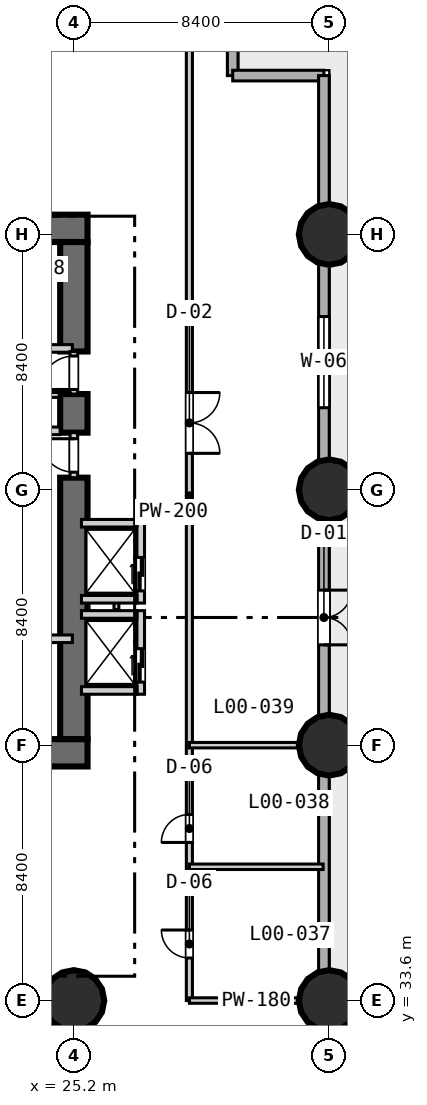
"""IFC4 building model, lengths in metres.
Left out: names, types, materials, properties, quantities, classifications, styles, units other than length and angle.
Written with IfcOpenShell. Run it as: python <this file> out.ifc"""

import sys

from ifc_helpers import new_model, si_unit, direction, frame, frame_2d, origin, origin_2d, place, context, subcontext, project, spatial, rectangle, circle, extrude, element, fill, save


model = new_model("IFC4")
c1 = context("Model", 3, precision=1e-05, world=origin(), true_north=direction((0.0, 1.0)))
c2 = subcontext(c1, "Body", "Model", "MODEL_VIEW")
j1 = project(units=[si_unit("LENGTHUNIT", "METRE"), si_unit("PLANEANGLEUNIT", "RADIAN")], contexts=[c1])
p1 = place(None, origin())
s1 = spatial("IfcSite", under=j1, at=p1, CompositionType="ELEMENT")
p2 = place(p1, origin())
s2 = spatial("IfcBuilding", under=s1, at=p2, CompositionType="ELEMENT")
p3 = place(p2, origin())
s3 = spatial("IfcBuildingStorey", under=s2, at=p3, CompositionType="ELEMENT", Elevation=0.0)
for number, where, z_axis, x_axis in (
    (1, (20.5, 41.75, 0.0), (0.0, 0.0, 1.0), (1.0, 0.0, 0.0)),
    (2, (20.5, 59.0, 0.0), (0.0, 0.0, 1.0), (1.0, 0.0, 0.0)),
):
    element("IfcWall", number, at=place(p3, frame(where, z_axis=z_axis, x_axis=x_axis)), inside=s3, PredefinedType="SHEAR", context=c2, shape_type="SweptSolid", body=[
        extrude(rectangle(XDim=5.15, YDim=0.9, at=frame_2d((2.575, 0.0))), origin(), (0.0, 0.0, 1.0), 5.65),
    ])
p4 = place(p3, frame((25.2, 42.2, 0.0), z_axis=(0.0, 0.0, 1.0), x_axis=(0.0, 1.0, 0.0)))
e3 = element("IfcWall", 3, at=p4, inside=s3, PredefinedType="SHEAR", context=c2, shape_type="SweptSolid", body=[
    extrude(rectangle(XDim=8.6, YDim=0.9, at=frame_2d((4.3, 0.0))), origin(), (0.0, 0.0, 1.0), 5.65),
])
p5 = place(p3, frame((25.2, 52.28, 0.0), z_axis=(0.0, 0.0, 1.0), x_axis=(0.0, 1.0, 0.0)))
e4 = element("IfcWall", 4, at=p5, inside=s3, PredefinedType="SHEAR", context=c2, shape_type="SweptSolid", body=[
    extrude(rectangle(XDim=1.27, YDim=0.9, at=frame_2d((0.635, 0.0))), origin(), (0.0, 0.0, 1.0), 5.65),
])
p6 = place(p3, frame((25.2, 54.95, 0.0), z_axis=(0.0, 0.0, 1.0), x_axis=(0.0, 1.0, 0.0)))
e5 = element("IfcWall", 5, at=p6, inside=s3, PredefinedType="SHEAR", context=c2, shape_type="SweptSolid", body=[
    extrude(rectangle(XDim=3.6, YDim=0.9, at=frame_2d((1.8, 0.0))), origin(), (0.0, 0.0, 1.0), 5.65),
])
for number, where, z_axis, x_axis in (
    (6, (25.2, 33.6, 0.0), (0.0, 0.0, 1.0), (1.0, 0.0, 0.0)),
    (7, (33.6, 33.6, 0.0), (0.0, 0.0, 1.0), (1.0, 0.0, 0.0)),
    (8, (33.6, 42.0, 0.0), (0.0, 0.0, 1.0), (1.0, 0.0, 0.0)),
    (9, (33.6, 50.4, 0.0), (0.0, 0.0, 1.0), (1.0, 0.0, 0.0)),
    (10, (33.6, 58.8, 0.0), (0.0, 0.0, 1.0), (1.0, 0.0, 0.0)),
):
    element("IfcColumn", number, at=place(p3, frame(where, z_axis=z_axis, x_axis=x_axis)), inside=s3, PredefinedType="USERDEFINED", context=c2, shape_type="SweptSolid", body=[
        extrude(circle(Radius=1.0, at=origin_2d()), origin(), (0.0, 0.0, 1.0), 6.0),
    ])
for number, where, z_axis, x_axis in (
    (11, (30.425, 67.025, 0.0), (0.0, 0.0, 1.0), (0.0, -1.0, 0.0)),
    (12, (30.425, 64.025, 0.0), (0.0, 0.0, 1.0), (1.0, 0.0, 0.0)),
):
    element("IfcWall", number, at=place(p3, frame(where, z_axis=z_axis, x_axis=x_axis)), inside=s3, PredefinedType="STANDARD", context=c2, shape_type="SweptSolid", body=[
        extrude(rectangle(XDim=3.0, YDim=0.35, at=frame_2d((1.5, 0.0))), origin(), (0.0, 0.0, 1.0), 5.65),
    ])
p7 = place(p3, frame((33.425, 64.025, 0.0), z_axis=(0.0, 0.0, 1.0), x_axis=(0.0, -1.0, 0.0)))
e13 = element("IfcWall", 13, at=p7, inside=s3, PredefinedType="STANDARD", context=c2, shape_type="SweptSolid", body=[
    extrude(rectangle(XDim=30.6, YDim=0.35, at=frame_2d((15.3, 0.0))), origin(), (0.0, 0.0, 1.0), 4.8),
])
p8 = place(p7, frame((16.925, 0.0, 0.0)))
e14 = element("IfcOpeningElement", 14, at=p8, cuts=e13, PredefinedType="OPENING", context=c2, shape_type="SweptSolid", body=[
    extrude(rectangle(XDim=1.8, YDim=2.2, at=frame_2d((0.9, 1.1))), frame((0.0, 0.185, 0.0), z_axis=(0.0, -1.0, 0.0), x_axis=(1.0, 0.0, 0.0)), (0.0, 0.0, 1.0), 0.37),
])
p9 = place(p7, frame((7.925, 0.0, 0.85)))
e15 = element("IfcOpeningElement", 15, at=p9, cuts=e13, PredefinedType="OPENING", context=c2, shape_type="SweptSolid", body=[
    extrude(rectangle(XDim=3.0, YDim=2.4, at=frame_2d((1.5, 1.2))), frame((0.0, 0.185, 0.0), z_axis=(0.0, -1.0, 0.0), x_axis=(1.0, 0.0, 0.0)), (0.0, 0.0, 1.0), 0.37),
])
p10 = place(p3, frame((33.425, 33.425, 0.0), z_axis=(0.0, 0.0, 1.0), x_axis=(1.0, 0.0, 0.0)))
e16 = element("IfcWall", 16, at=p10, inside=s3, PredefinedType="STANDARD", context=c2, shape_type="SweptSolid", body=[
    extrude(rectangle(XDim=30.6, YDim=0.35, at=frame_2d((15.3, 0.0))), origin(), (0.0, 0.0, 1.0), 4.8),
])
p11 = place(p3, frame((21.0, 45.5, 0.0), z_axis=(0.0, 0.0, 1.0), x_axis=(1.0, 0.0, 0.0)))
e17 = element("IfcWall", 17, at=p11, inside=s3, PredefinedType="SOLIDWALL", context=c2, shape_type="SweptSolid", body=[
    extrude(rectangle(XDim=4.15, YDim=0.25, at=frame_2d((2.075, 0.0))), origin(), (0.0, 0.0, 1.0), 5.65),
])
p12 = place(p11, frame((0.65, 0.0, 0.0)))
e18 = element("IfcOpeningElement", 18, at=p12, cuts=e17, PredefinedType="OPENING", context=c2, shape_type="SweptSolid", body=[
    extrude(rectangle(XDim=1.1, YDim=2.15, at=frame_2d((0.55, 1.075))), frame((0.0, 0.135, 0.0), z_axis=(0.0, -1.0, 0.0), x_axis=(1.0, 0.0, 0.0)), (0.0, 0.0, 1.0), 0.27),
])
p13 = place(p3, frame((25.2, 50.8, 0.0), z_axis=(0.0, 0.0, 1.0), x_axis=(0.0, 1.0, 0.0)))
e19 = element("IfcWall", 19, at=p13, inside=s3, PredefinedType="SOLIDWALL", context=c2, shape_type="SweptSolid", body=[
    extrude(rectangle(XDim=1.48, YDim=0.25, at=frame_2d((0.74, 0.0))), origin(), (0.0, 0.0, 1.0), 5.65),
])
p14 = place(p13, frame((0.18, 0.0, 0.0)))
e20 = element("IfcOpeningElement", 20, at=p14, cuts=e19, PredefinedType="OPENING", context=c2, shape_type="SweptSolid", body=[
    extrude(rectangle(XDim=1.1, YDim=2.15, at=frame_2d((0.55, 1.075))), frame((0.0, 0.135, 0.0), z_axis=(0.0, -1.0, 0.0), x_axis=(1.0, 0.0, 0.0)), (0.0, 0.0, 1.0), 0.27),
])
p15 = place(p3, frame((21.0, 52.34, 0.0), z_axis=(0.0, 0.0, 1.0), x_axis=(1.0, 0.0, 0.0)))
e21 = element("IfcWall", 21, at=p15, inside=s3, PredefinedType="SOLIDWALL", context=c2, shape_type="SweptSolid", body=[
    extrude(rectangle(XDim=3.75, YDim=0.25, at=frame_2d((1.875, 0.0))), origin(), (0.0, 0.0, 1.0), 5.65),
])
p16 = place(p3, frame((21.0, 55.05, 0.0), z_axis=(0.0, 0.0, 1.0), x_axis=(1.0, 0.0, 0.0)))
e22 = element("IfcWall", 22, at=p16, inside=s3, PredefinedType="SOLIDWALL", context=c2, shape_type="SweptSolid", body=[
    extrude(rectangle(XDim=4.15, YDim=0.25, at=frame_2d((2.075, 0.0))), origin(), (0.0, 0.0, 1.0), 5.65),
])
p17 = place(p16, frame((1.85, 0.0, 0.0)))
e23 = element("IfcOpeningElement", 23, at=p17, cuts=e22, PredefinedType="OPENING", context=c2, shape_type="SweptSolid", body=[
    extrude(rectangle(XDim=1.1, YDim=2.15, at=frame_2d((0.55, 1.075))), frame((0.0, 0.135, 0.0), z_axis=(0.0, -1.0, 0.0), x_axis=(1.0, 0.0, 0.0)), (0.0, 0.0, 1.0), 0.27),
])
p18 = place(p3, frame((25.2, 53.55, 0.0), z_axis=(0.0, 0.0, 1.0), x_axis=(0.0, 1.0, 0.0)))
e24 = element("IfcWall", 24, at=p18, inside=s3, PredefinedType="SOLIDWALL", context=c2, shape_type="SweptSolid", body=[
    extrude(rectangle(XDim=1.4, YDim=0.25, at=frame_2d((0.7, 0.0))), origin(), (0.0, 0.0, 1.0), 5.65),
])
p19 = place(p18, frame((0.15, 0.0, 0.0)))
e25 = element("IfcOpeningElement", 25, at=p19, cuts=e24, PredefinedType="OPENING", context=c2, shape_type="SweptSolid", body=[
    extrude(rectangle(XDim=1.1, YDim=2.15, at=frame_2d((0.55, 1.075))), frame((0.0, 0.135, 0.0), z_axis=(0.0, -1.0, 0.0), x_axis=(1.0, 0.0, 0.0)), (0.0, 0.0, 1.0), 0.27),
])
p20 = place(p3, frame((22.32, 53.52, 0.0), z_axis=(0.0, 0.0, 1.0), x_axis=(1.0, 0.0, 0.0)))
e26 = element("IfcWall", 26, at=p20, inside=s3, PredefinedType="PARTITIONING", context=c2, shape_type="SweptSolid", body=[
    extrude(rectangle(XDim=2.4, YDim=0.16, at=frame_2d((1.2, 0.0))), origin(), (0.0, 0.0, 1.0), 5.65),
])
p21 = place(p20, frame((0.65, 0.0, 0.0)))
e27 = element("IfcOpeningElement", 27, at=p21, cuts=e26, PredefinedType="OPENING", context=c2, shape_type="SweptSolid", body=[
    extrude(rectangle(XDim=0.9, YDim=2.1, at=frame_2d((0.45, 1.05))), frame((0.0, 0.09, 0.0), z_axis=(0.0, -1.0, 0.0), x_axis=(1.0, 0.0, 0.0)), (0.0, 0.0, 1.0), 0.18),
])
p22 = place(p3, frame((27.4, 43.675, 0.0), z_axis=(0.0, 0.0, 1.0), x_axis=(0.0, 1.0, 0.0)))
e28 = element("IfcWall", 28, at=p22, inside=s3, PredefinedType="SOLIDWALL", context=c2, shape_type="SweptSolid", body=[
    extrude(rectangle(XDim=2.75, YDim=0.25, at=frame_2d((1.375, 0.0))), origin(), (0.0, 0.0, 1.0), 5.65),
])
p23 = place(p22, frame((0.4, 0.0, 0.0)))
e29 = element("IfcOpeningElement", 29, at=p23, cuts=e28, PredefinedType="OPENING", context=c2, shape_type="SweptSolid", body=[
    extrude(rectangle(XDim=1.1, YDim=2.15, at=frame_2d((0.55, 1.075))), frame((0.0, 0.135, 0.0), z_axis=(0.0, -1.0, 0.0), x_axis=(1.0, 0.0, 0.0)), (0.0, 0.0, 1.0), 0.27),
])
for number, where, z_axis, x_axis in (
    (30, (25.45, 43.8, 0.0), (0.0, 0.0, 1.0), (1.0, 0.0, 0.0)),
    (31, (25.45, 46.3, 0.0), (0.0, 0.0, 1.0), (1.0, 0.0, 0.0)),
):
    element("IfcWall", number, at=place(p3, frame(where, z_axis=z_axis, x_axis=x_axis)), inside=s3, PredefinedType="SOLIDWALL", context=c2, shape_type="SweptSolid", body=[
        extrude(rectangle(XDim=1.825, YDim=0.25, at=frame_2d((0.913, 0.0))), origin(), (0.0, 0.0, 1.0), 5.65),
    ])
p24 = place(p3, frame((26.6, 46.46, 0.0), z_axis=(0.0, 0.0, 1.0), x_axis=(0.0, 1.0, 0.0)))
e32 = element("IfcWall", 32, at=p24, inside=s3, PredefinedType="PARTITIONING", context=c2, shape_type="SweptSolid", body=[
    extrude(rectangle(XDim=0.88, YDim=0.16, at=frame_2d((0.44, 0.0))), origin(), (0.0, 0.0, 1.0), 5.65),
])
p25 = place(p3, frame((27.4, 46.675, 0.0), z_axis=(0.0, 0.0, 1.0), x_axis=(0.0, 1.0, 0.0)))
e33 = element("IfcWall", 33, at=p25, inside=s3, PredefinedType="SOLIDWALL", context=c2, shape_type="SweptSolid", body=[
    extrude(rectangle(XDim=2.75, YDim=0.25, at=frame_2d((1.375, 0.0))), origin(), (0.0, 0.0, 1.0), 5.65),
])
p26 = place(p25, frame((0.4, 0.0, 0.0)))
e34 = element("IfcOpeningElement", 34, at=p26, cuts=e33, PredefinedType="OPENING", context=c2, shape_type="SweptSolid", body=[
    extrude(rectangle(XDim=1.1, YDim=2.15, at=frame_2d((0.55, 1.075))), frame((0.0, 0.135, 0.0), z_axis=(0.0, -1.0, 0.0), x_axis=(1.0, 0.0, 0.0)), (0.0, 0.0, 1.0), 0.27),
])
for number, where, z_axis, x_axis in (
    (35, (25.45, 46.8, 0.0), (0.0, 0.0, 1.0), (1.0, 0.0, 0.0)),
    (36, (25.45, 49.3, 0.0), (0.0, 0.0, 1.0), (1.0, 0.0, 0.0)),
):
    element("IfcWall", number, at=place(p3, frame(where, z_axis=z_axis, x_axis=x_axis)), inside=s3, PredefinedType="SOLIDWALL", context=c2, shape_type="SweptSolid", body=[
        extrude(rectangle(XDim=1.825, YDim=0.25, at=frame_2d((0.913, 0.0))), origin(), (0.0, 0.0, 1.0), 5.65),
    ])
p27 = place(p3, frame((29.0, 33.6, 0.0), z_axis=(0.0, 0.0, 1.0), x_axis=(0.0, 1.0, 0.0)))
e37 = element("IfcWall", 37, at=p27, inside=s3, PredefinedType="PARTITIONING", context=c2, shape_type="SweptSolid", body=[
    extrude(rectangle(XDim=33.2, YDim=0.2, at=frame_2d((16.6, 0.0))), origin(), (0.0, 0.0, 1.0), 5.65),
])
p28 = place(p27, frame((1.4, 0.0, 0.0)))
e38 = element("IfcOpeningElement", 38, at=p28, cuts=e37, PredefinedType="OPENING", context=c2, shape_type="SweptSolid", body=[
    extrude(rectangle(XDim=0.92, YDim=2.1, at=frame_2d((0.46, 1.05))), frame((0.0, 0.11, 0.0), z_axis=(0.0, -1.0, 0.0), x_axis=(1.0, 0.0, 0.0)), (0.0, 0.0, 1.0), 0.22),
])
p29 = place(p27, frame((5.2, 0.0, 0.0)))
e39 = element("IfcOpeningElement", 39, at=p29, cuts=e37, PredefinedType="OPENING", context=c2, shape_type="SweptSolid", body=[
    extrude(rectangle(XDim=0.92, YDim=2.1, at=frame_2d((0.46, 1.05))), frame((0.0, 0.11, 0.0), z_axis=(0.0, -1.0, 0.0), x_axis=(1.0, 0.0, 0.0)), (0.0, 0.0, 1.0), 0.22),
])
p30 = place(p27, frame((18.0, 0.0, 0.0)))
e40 = element("IfcOpeningElement", 40, at=p30, cuts=e37, PredefinedType="OPENING", context=c2, shape_type="SweptSolid", body=[
    extrude(rectangle(XDim=2.0, YDim=2.15, at=frame_2d((1.0, 1.075))), frame((0.0, 0.11, 0.0), z_axis=(0.0, -1.0, 0.0), x_axis=(1.0, 0.0, 0.0)), (0.0, 0.0, 1.0), 0.22),
])
p31 = place(p3, frame((29.0, 33.6, 0.0), z_axis=(0.0, 0.0, 1.0), x_axis=(1.0, 0.0, 0.0)))
e41 = element("IfcWall", 41, at=p31, inside=s3, PredefinedType="PLUMBINGWALL", context=c2, shape_type="SweptSolid", body=[
    extrude(rectangle(XDim=4.4, YDim=0.18, at=frame_2d((2.2, 0.0))), origin(), (0.0, 0.0, 1.0), 5.039),
])
p32 = place(p3, frame((29.0, 38.0, 0.0), z_axis=(0.0, 0.0, 1.0), x_axis=(1.0, 0.0, 0.0)))
e42 = element("IfcWall", 42, at=p32, inside=s3, PredefinedType="PLUMBINGWALL", context=c2, shape_type="SweptSolid", body=[
    extrude(rectangle(XDim=4.4, YDim=0.18, at=frame_2d((2.2, 0.0))), origin(), (0.0, 0.0, 1.0), 5.65),
])
p33 = place(p3, frame((29.0, 42.0, 0.0), z_axis=(0.0, 0.0, 1.0), x_axis=(1.0, 0.0, 0.0)))
e43 = element("IfcWall", 43, at=p33, inside=s3, PredefinedType="PLUMBINGWALL", context=c2, shape_type="SweptSolid", body=[
    extrude(rectangle(XDim=4.4, YDim=0.18, at=frame_2d((2.2, 0.0))), origin(), (0.0, 0.0, 1.0), 4.8),
])
p34 = place(p8, origin())
e44 = element("IfcDoor", 44, at=p34, inside=s3, OperationType="DOUBLE_SWING_LEFT", PredefinedType="DOOR", context=c2, shape_type="SweptSolid", body=[
    extrude(rectangle(XDim=1.8, YDim=2.2, at=frame_2d((0.9, 1.1))), frame((0.0, 0.025, 0.0), z_axis=(0.0, -1.0, 0.0), x_axis=(1.0, 0.0, 0.0)), (0.0, 0.0, 1.0), 0.05),
])
fill(e14, e44)
p35 = place(p9, origin())
e45 = element("IfcWindow", 45, at=p35, inside=s3, PartitioningType="SINGLE_PANEL", PredefinedType="WINDOW", context=c2, shape_type="SweptSolid", body=[
    extrude(rectangle(XDim=3.0, YDim=2.4, at=frame_2d((1.5, 1.2))), frame((0.0, 0.03, 0.0), z_axis=(0.0, -1.0, 0.0), x_axis=(1.0, 0.0, 0.0)), (0.0, 0.0, 1.0), 0.06),
])
fill(e15, e45)
p36 = place(p14, origin())
e46 = element("IfcDoor", 46, at=p36, inside=s3, OperationType="SINGLE_SWING_RIGHT", PredefinedType="DOOR", context=c2, shape_type="SweptSolid", body=[
    extrude(rectangle(XDim=1.1, YDim=2.15, at=frame_2d((0.55, 1.075))), frame((0.0, 0.025, 0.0), z_axis=(0.0, -1.0, 0.0), x_axis=(1.0, 0.0, 0.0)), (0.0, 0.0, 1.0), 0.05),
])
fill(e20, e46)
p37 = place(p19, origin())
e47 = element("IfcDoor", 47, at=p37, inside=s3, OperationType="SINGLE_SWING_LEFT", PredefinedType="DOOR", context=c2, shape_type="SweptSolid", body=[
    extrude(rectangle(XDim=1.1, YDim=2.15, at=frame_2d((0.55, 1.075))), frame((0.0, 0.025, 0.0), z_axis=(0.0, -1.0, 0.0), x_axis=(1.0, 0.0, 0.0)), (0.0, 0.0, 1.0), 0.05),
])
fill(e25, e47)
p38 = place(p23, origin())
e48 = element("IfcDoor", 48, at=p38, inside=s3, OperationType="SLIDING_TO_LEFT", PredefinedType="DOOR", context=c2, shape_type="SweptSolid", body=[
    extrude(rectangle(XDim=1.1, YDim=2.15, at=frame_2d((0.55, 1.075))), frame((0.0, 0.025, 0.0), z_axis=(0.0, -1.0, 0.0), x_axis=(1.0, 0.0, 0.0)), (0.0, 0.0, 1.0), 0.05),
])
fill(e29, e48)
p39 = place(p26, origin())
e49 = element("IfcDoor", 49, at=p39, inside=s3, OperationType="SLIDING_TO_LEFT", PredefinedType="DOOR", context=c2, shape_type="SweptSolid", body=[
    extrude(rectangle(XDim=1.1, YDim=2.15, at=frame_2d((0.55, 1.075))), frame((0.0, 0.025, 0.0), z_axis=(0.0, -1.0, 0.0), x_axis=(1.0, 0.0, 0.0)), (0.0, 0.0, 1.0), 0.05),
])
fill(e34, e49)
p40 = place(p28, origin())
e50 = element("IfcDoor", 50, at=p40, inside=s3, OperationType="SINGLE_SWING_RIGHT", PredefinedType="DOOR", context=c2, shape_type="SweptSolid", body=[
    extrude(rectangle(XDim=0.92, YDim=2.1, at=frame_2d((0.46, 1.05))), frame((0.0, 0.025, 0.0), z_axis=(0.0, -1.0, 0.0), x_axis=(1.0, 0.0, 0.0)), (0.0, 0.0, 1.0), 0.05),
])
fill(e38, e50)
p41 = place(p29, origin())
e51 = element("IfcDoor", 51, at=p41, inside=s3, OperationType="SINGLE_SWING_LEFT", PredefinedType="DOOR", context=c2, shape_type="SweptSolid", body=[
    extrude(rectangle(XDim=0.92, YDim=2.1, at=frame_2d((0.46, 1.05))), frame((0.0, 0.025, 0.0), z_axis=(0.0, -1.0, 0.0), x_axis=(1.0, 0.0, 0.0)), (0.0, 0.0, 1.0), 0.05),
])
fill(e39, e51)
p42 = place(p30, origin())
e52 = element("IfcDoor", 52, at=p42, inside=s3, OperationType="SINGLE_SWING_RIGHT", PredefinedType="DOOR", context=c2, shape_type="SweptSolid", body=[
    extrude(rectangle(XDim=2.0, YDim=2.15, at=frame_2d((1.0, 1.075))), frame((0.0, 0.025, 0.0), z_axis=(0.0, -1.0, 0.0), x_axis=(1.0, 0.0, 0.0)), (0.0, 0.0, 1.0), 0.05),
])
fill(e40, e52)
save(model, sys.argv[1])
